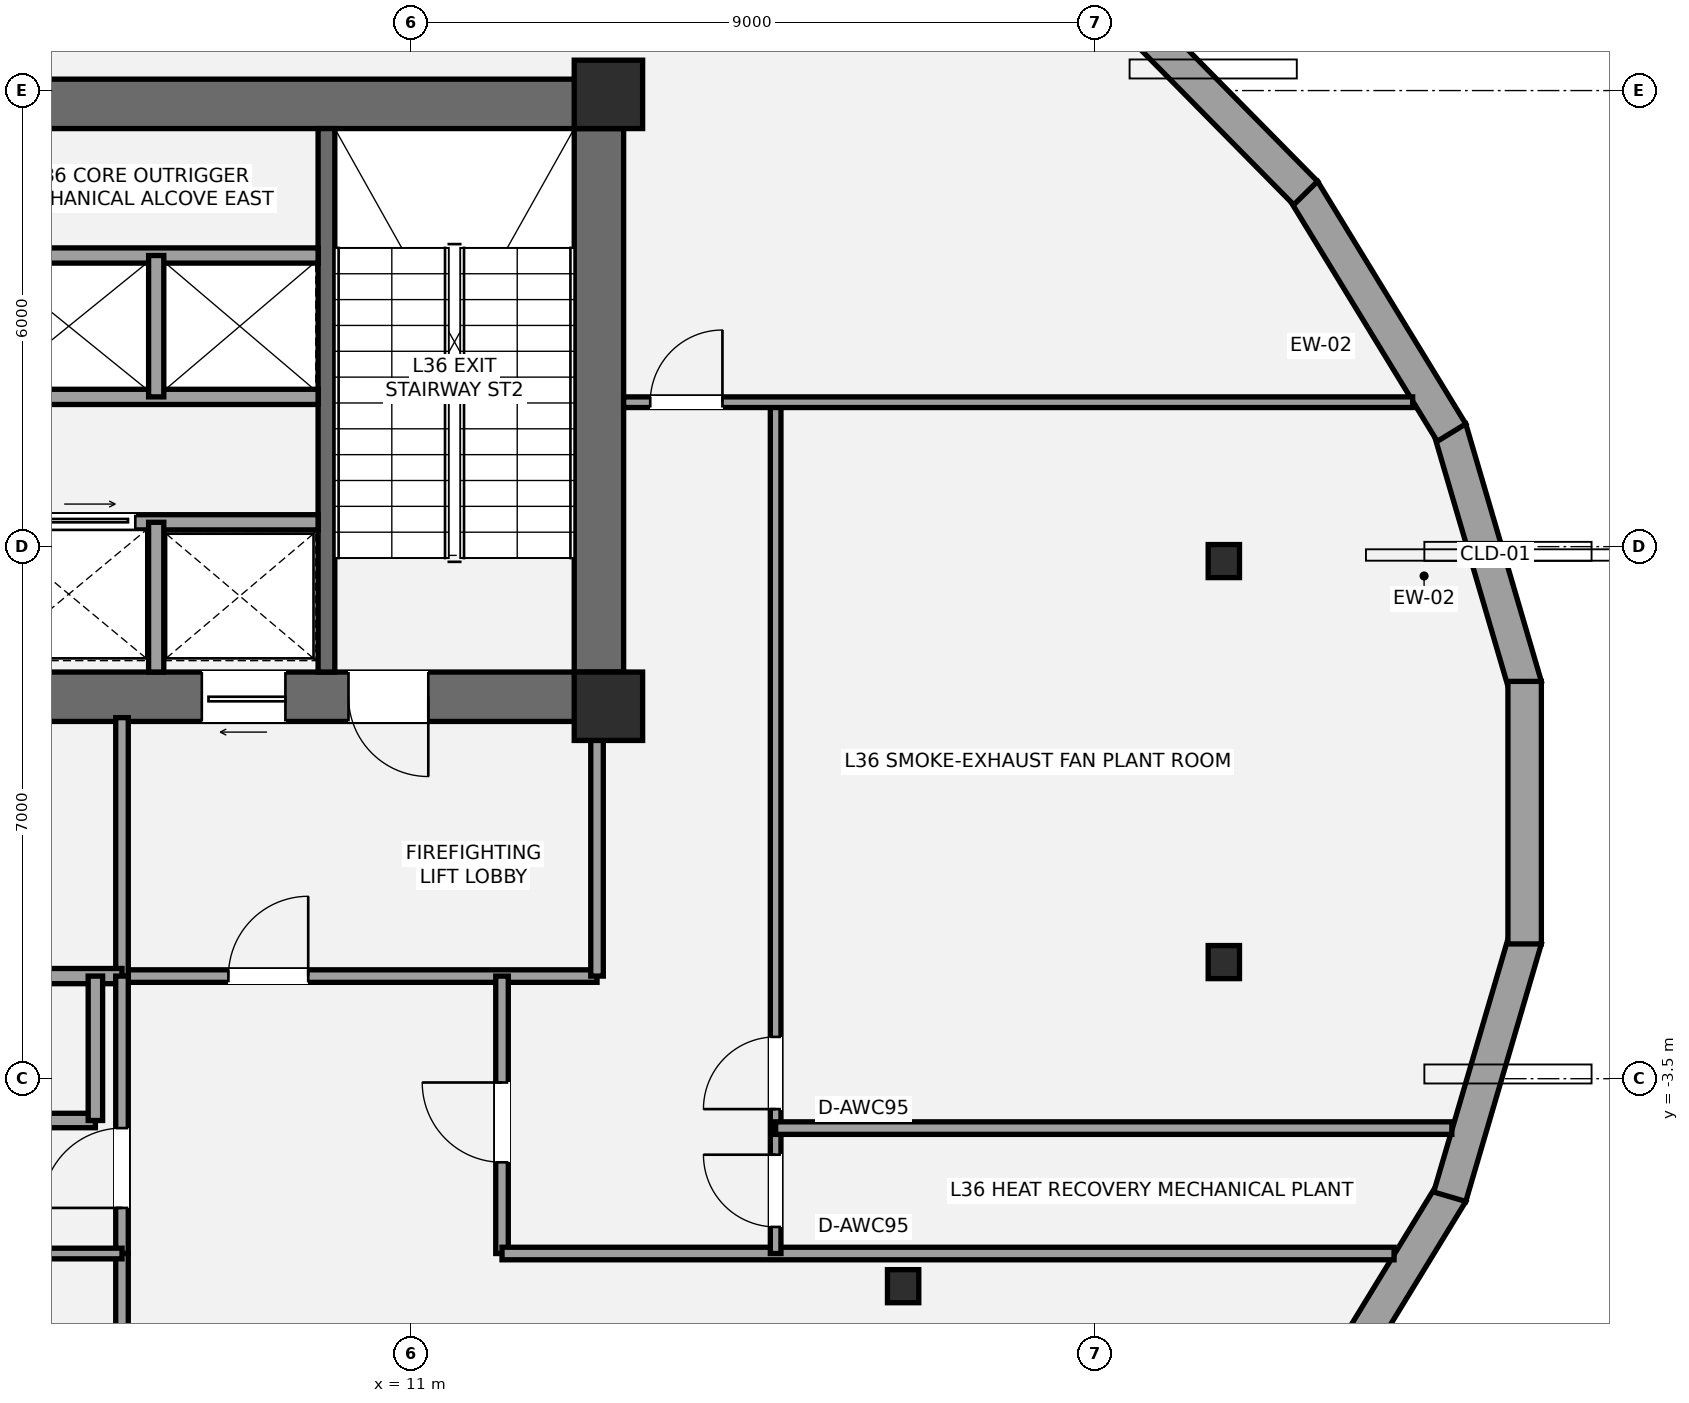
"""IFC4 building model, lengths in metres.
Left out: names, types, materials, properties, quantities, classifications, styles, units other than length and angle.
Written with IfcOpenShell. Run it as: python <this file> out.ifc"""

import sys

from ifc_helpers import new_model, si_unit, direction, frame, frame_2d, origin, origin_2d, place, context, subcontext, project, spatial, rectangle, i_section, extrude, element, fill, save


model = new_model("IFC4")
c1 = context("Model", 3, precision=1e-05, world=origin(), true_north=direction((0.0, 1.0)))
c2 = subcontext(c1, "Body", "Model", "MODEL_VIEW")
j1 = project(units=[si_unit("LENGTHUNIT", "METRE"), si_unit("PLANEANGLEUNIT", "RADIAN")], contexts=[c1])
p1 = place(None, origin())
s1 = spatial("IfcSite", under=j1, at=p1, CompositionType="ELEMENT")
p2 = place(p1, origin())
s2 = spatial("IfcBuilding", under=s1, at=p2, CompositionType="ELEMENT")
p3 = place(p2, frame((0.0, 0.0, 135.1)))
s3 = spatial("IfcBuildingStorey", under=s2, at=p3, CompositionType="ELEMENT", Elevation=135.1)
p4 = place(p3, frame((13.475, 1.2, 0.0), z_axis=(0.0, 0.0, 1.0), x_axis=(0.0, 1.0, 0.0)))
e1 = element("IfcWall", 1, at=p4, inside=s3, PredefinedType="SHEAR", context=c2, shape_type="SweptSolid", body=[
    extrude(rectangle(XDim=8.45, YDim=0.65, at=frame_2d((4.225, 0.0))), origin(), (0.0, 0.0, 1.0), 4.5),
])
p5 = place(p3, frame((4.475, 9.325, 0.0), z_axis=(0.0, 0.0, 1.0), x_axis=(1.0, 0.0, 0.0)))
e2 = element("IfcWall", 2, at=p5, inside=s3, PredefinedType="SHEAR", context=c2, shape_type="SweptSolid", body=[
    extrude(rectangle(XDim=9.325, YDim=0.65, at=frame_2d((4.663, 0.0))), origin(), (0.0, 0.0, 1.0), 4.5),
])
p6 = place(p3, frame((13.8, 1.525, 0.0), z_axis=(0.0, 0.0, 1.0), x_axis=(-1.0, 0.0, 0.0)))
e3 = element("IfcWall", 3, at=p6, inside=s3, PredefinedType="SHEAR", context=c2, shape_type="SweptSolid", body=[
    extrude(rectangle(XDim=8.925, YDim=0.65, at=frame_2d((4.462, 0.0))), origin(), (0.0, 0.0, 1.0), 4.5),
])
p7 = place(p6, frame((2.57, 0.0, 0.0)))
e4 = element("IfcOpeningElement", 4, at=p7, cuts=e3, PredefinedType="OPENING", context=c2, shape_type="SweptSolid", body=[
    extrude(rectangle(XDim=1.05, YDim=2.15, at=frame_2d((0.525, 1.075))), frame((0.0, 0.335, 0.0), z_axis=(0.0, -1.0, 0.0), x_axis=(1.0, 0.0, 0.0)), (0.0, 0.0, 1.0), 0.67),
])
p8 = place(p6, frame((4.45, 0.0, 0.0)))
e5 = element("IfcOpeningElement", 5, at=p8, cuts=e3, PredefinedType="OPENING", context=c2, shape_type="SweptSolid", body=[
    extrude(rectangle(XDim=1.1, YDim=2.2, at=frame_2d((0.55, 1.1))), frame((0.0, 0.335, 0.0), z_axis=(0.0, -1.0, 0.0), x_axis=(1.0, 0.0, 0.0)), (0.0, 0.0, 1.0), 0.67),
])
p9 = place(p3, frame((9.89, 1.85, 0.0), z_axis=(0.0, 0.0, 1.0), x_axis=(0.0, 1.0, 0.0)))
e6 = element("IfcWall", 6, at=p9, inside=s3, PredefinedType="SHEAR", context=c2, shape_type="SweptSolid", body=[
    extrude(rectangle(XDim=7.15, YDim=0.22, at=frame_2d((3.575, 0.0))), origin(), (0.0, 0.0, 1.0), 4.5),
])
for number, where, z_axis, x_axis in (
    (7, (13.6, 1.4, 0.0), (0.0, 0.0, 1.0), (1.0, 0.0, 0.0)),
    (8, (13.6, 9.45, 0.0), (0.0, 0.0, 1.0), (1.0, 0.0, 0.0)),
):
    element("IfcColumn", number, at=place(p3, frame(where, z_axis=z_axis, x_axis=x_axis)), inside=s3, PredefinedType="COLUMN", context=c2, shape_type="SweptSolid", body=[
        extrude(rectangle(XDim=0.9, YDim=0.9, at=origin_2d()), origin(), (0.0, 0.0, 1.0), 4.5),
    ])
for number, where, z_axis, x_axis in (
    (9, (21.697, 3.31, 0.0), (0.0, 0.0, 1.0), (1.0, 0.0, 0.0)),
    (10, (17.477, -6.229, 0.0), (0.0, 0.0, 1.0), (1.0, 0.0, 0.0)),
    (11, (21.697, -1.966, 0.0), (0.0, 0.0, 1.0), (1.0, 0.0, 0.0)),
):
    element("IfcColumn", number, at=place(p3, frame(where, z_axis=z_axis, x_axis=x_axis)), inside=s3, PredefinedType="COLUMN", context=c2, shape_type="SweptSolid", body=[
        extrude(i_section(OverallWidth=0.412, OverallDepth=0.435, WebThickness=0.036, FlangeThickness=0.057, at=origin_2d()), origin(), (0.0, 0.0, 1.0), 4.5),
    ])
p10 = place(p3, frame((24.669, 5.053, 0.0), z_axis=(0.0, 0.0, 1.0), x_axis=(0.28170956188, -0.959499725245, 0.0)))
e12 = element("IfcWall", 12, at=p10, inside=s3, PredefinedType="STANDARD", context=c2, shape_type="SweptSolid", body=[
    extrude(rectangle(XDim=3.531, YDim=0.44, at=frame_2d((1.765, 0.0))), origin(), (0.0, 0.0, 1.0), 3.498),
])
p11 = place(p3, frame((22.742, 8.191, 0.0), z_axis=(0.0, 0.0, 1.0), x_axis=(0.521476412293, -0.853265698022, 0.0)))
e13 = element("IfcWall", 13, at=p11, inside=s3, PredefinedType="STANDARD", context=c2, shape_type="SweptSolid", body=[
    extrude(rectangle(XDim=3.74, YDim=0.44, at=frame_2d((1.87, 0.0))), origin(), (0.0, 0.0, 1.0), 3.498),
])
p12 = place(p3, frame((19.942, 11.023, 0.0), z_axis=(0.0, 0.0, 1.0), x_axis=(0.702094935552, -0.712083352897, 0.0)))
e14 = element("IfcWall", 14, at=p12, inside=s3, PredefinedType="STANDARD", context=c2, shape_type="SweptSolid", body=[
    extrude(rectangle(XDim=4.033, YDim=0.44, at=frame_2d((2.017, 0.0))), origin(), (0.0, 0.0, 1.0), 3.498),
])
p13 = place(p3, frame((24.693, -5.0, 0.0), z_axis=(0.0, 0.0, 1.0), x_axis=(-0.521476412293, -0.853265698022, 0.0)))
e15 = element("IfcWall", 15, at=p13, inside=s3, PredefinedType="STANDARD", context=c2, shape_type="SweptSolid", body=[
    extrude(rectangle(XDim=3.74, YDim=0.44, at=frame_2d((1.87, 0.0))), origin(), (0.0, 0.0, 1.0), 3.498),
])
p14 = place(p3, frame((25.664, -1.665, 0.0), z_axis=(0.0, 0.0, 1.0), x_axis=(-0.28170956188, -0.959499725245, 0.0)))
e16 = element("IfcWall", 16, at=p14, inside=s3, PredefinedType="STANDARD", context=c2, shape_type="SweptSolid", body=[
    extrude(rectangle(XDim=3.531, YDim=0.44, at=frame_2d((1.765, 0.0))), origin(), (0.0, 0.0, 1.0), 3.498),
])
p15 = place(p3, frame((25.655, 1.727, 0.0), z_axis=(0.0, 0.0, 1.0), x_axis=(0.0, -1.0, 0.0)))
e17 = element("IfcWall", 17, at=p15, inside=s3, PredefinedType="STANDARD", context=c2, shape_type="SweptSolid", body=[
    extrude(rectangle(XDim=3.454, YDim=0.44, at=frame_2d((1.727, 0.0))), origin(), (0.0, 0.0, 1.0), 3.498),
])
p16 = place(p3, frame((7.2, -2.15, 0.0), z_axis=(0.0, 0.0, 1.0), x_axis=(1.0, 0.0, 0.0)))
e18 = element("IfcWall", 18, at=p16, inside=s3, PredefinedType="PARTITIONING", context=c2, shape_type="SweptSolid", body=[
    extrude(rectangle(XDim=6.25, YDim=0.165, at=frame_2d((3.125, 0.0))), origin(), (0.0, 0.0, 1.0), 4.28),
])
p17 = place(p16, frame((1.4, 0.0, 0.0)))
e19 = element("IfcOpeningElement", 19, at=p17, cuts=e18, PredefinedType="OPENING", context=c2, shape_type="SweptSolid", body=[
    extrude(rectangle(XDim=1.05, YDim=2.15, at=frame_2d((0.525, 1.075))), frame((0.0, 0.093, 0.0), z_axis=(0.0, -1.0, 0.0), x_axis=(1.0, 0.0, 0.0)), (0.0, 0.0, 1.0), 0.185),
])
p18 = place(p3, frame((7.2, -2.15, 0.0), z_axis=(0.0, 0.0, 1.0), x_axis=(0.0, 1.0, 0.0)))
e20 = element("IfcWall", 20, at=p18, inside=s3, PredefinedType="PARTITIONING", context=c2, shape_type="SweptSolid", body=[
    extrude(rectangle(XDim=3.4, YDim=0.165, at=frame_2d((1.7, 0.0))), origin(), (0.0, 0.0, 1.0), 4.28),
])
p19 = place(p3, frame((13.45, -2.15, 0.0), z_axis=(0.0, 0.0, 1.0), x_axis=(0.0, 1.0, 0.0)))
e21 = element("IfcWall", 21, at=p19, inside=s3, PredefinedType="PARTITIONING", context=c2, shape_type="SweptSolid", body=[
    extrude(rectangle(XDim=3.4, YDim=0.165, at=frame_2d((1.7, 0.0))), origin(), (0.0, 0.0, 1.0), 2.47),
])
p20 = place(p3, frame((4.95, -2.15, 0.0), z_axis=(0.0, 0.0, 1.0), x_axis=(1.0, 0.0, 0.0)))
e22 = element("IfcWall", 22, at=p20, inside=s3, PredefinedType="SOLIDWALL", context=c2, shape_type="SweptSolid", body=[
    extrude(rectangle(XDim=2.25, YDim=0.2, at=frame_2d((1.125, 0.0))), origin(), (0.0, 0.0, 1.0), 2.47),
])
p21 = place(p3, frame((5.525, 3.82, 0.0), z_axis=(0.0, 0.0, 1.0), x_axis=(1.0, 0.0, 0.0)))
e23 = element("IfcWall", 23, at=p21, inside=s3, PredefinedType="SOLIDWALL", context=c2, shape_type="SweptSolid", body=[
    extrude(rectangle(XDim=4.255, YDim=0.2, at=frame_2d((2.127, 0.0))), origin(), (0.0, 0.0, 1.0), 4.28),
])
p22 = place(p21, frame((0.65, 0.0, 0.0)))
e24 = element("IfcOpeningElement", 24, at=p22, cuts=e23, PredefinedType="OPENING", context=c2, shape_type="SweptSolid", body=[
    extrude(rectangle(XDim=1.2, YDim=2.2, at=frame_2d((0.6, 1.1))), frame((0.0, 0.11, 0.0), z_axis=(0.0, -1.0, 0.0), x_axis=(1.0, 0.0, 0.0)), (0.0, 0.0, 1.0), 0.22),
])
p23 = place(p3, frame((7.65, 1.85, 0.0), z_axis=(0.0, 0.0, 1.0), x_axis=(0.0, 1.0, 0.0)))
e25 = element("IfcWall", 25, at=p23, inside=s3, PredefinedType="SOLIDWALL", context=c2, shape_type="SweptSolid", body=[
    extrude(rectangle(XDim=1.97, YDim=0.2, at=frame_2d((0.985, 0.0))), origin(), (0.0, 0.0, 1.0), 4.28),
])
for number, where, z_axis, x_axis in (
    (26, (5.525, 5.47, 0.0), (0.0, 0.0, 1.0), (1.0, 0.0, 0.0)),
    (27, (5.525, 7.33, 0.0), (0.0, 0.0, 1.0), (1.0, 0.0, 0.0)),
):
    element("IfcWall", number, at=place(p3, frame(where, z_axis=z_axis, x_axis=x_axis)), inside=s3, PredefinedType="SOLIDWALL", context=c2, shape_type="SweptSolid", body=[
        extrude(rectangle(XDim=4.255, YDim=0.2, at=frame_2d((2.127, 0.0))), origin(), (0.0, 0.0, 1.0), 4.28),
    ])
p24 = place(p3, frame((7.65, 5.47, 0.0), z_axis=(0.0, 0.0, 1.0), x_axis=(0.0, 1.0, 0.0)))
e28 = element("IfcWall", 28, at=p24, inside=s3, PredefinedType="SOLIDWALL", context=c2, shape_type="SweptSolid", body=[
    extrude(rectangle(XDim=1.86, YDim=0.2, at=frame_2d((0.93, 0.0))), origin(), (0.0, 0.0, 1.0), 4.28),
])
p25 = place(p3, frame((2.1, -4.05, 0.0), z_axis=(0.0, 0.0, 1.0), x_axis=(1.0, 0.0, 0.0)))
e29 = element("IfcWall", 29, at=p25, inside=s3, PredefinedType="PLUMBINGWALL", context=c2, shape_type="SweptSolid", body=[
    extrude(rectangle(XDim=4.75, YDim=0.19, at=frame_2d((2.375, 0.0))), origin(), (0.0, 0.0, 1.0), 2.47),
])
p26 = place(p25, frame((1.8, 0.0, 0.0)))
e30 = element("IfcOpeningElement", 30, at=p26, cuts=e29, PredefinedType="OPENING", context=c2, shape_type="SweptSolid", body=[
    extrude(rectangle(XDim=0.9, YDim=2.1, at=frame_2d((0.45, 1.05))), frame((0.0, 0.105, 0.0), z_axis=(0.0, -1.0, 0.0), x_axis=(1.0, 0.0, 0.0)), (0.0, 0.0, 1.0), 0.21),
])
p27 = place(p3, frame((6.85, -4.05, 0.0), z_axis=(0.0, 0.0, 1.0), x_axis=(0.0, 1.0, 0.0)))
e31 = element("IfcWall", 31, at=p27, inside=s3, PredefinedType="PLUMBINGWALL", context=c2, shape_type="SweptSolid", body=[
    extrude(rectangle(XDim=1.9, YDim=0.19, at=frame_2d((0.95, 0.0))), origin(), (0.0, 0.0, 1.0), 4.28),
])
p28 = place(p3, frame((7.2, -5.8, 0.0), z_axis=(0.0, 0.0, 1.0), x_axis=(0.0, 1.0, 0.0)))
e32 = element("IfcWall", 32, at=p28, inside=s3, PredefinedType="PARTITIONING", context=c2, shape_type="SweptSolid", body=[
    extrude(rectangle(XDim=3.65, YDim=0.165, at=frame_2d((1.825, 0.0))), origin(), (0.0, 0.0, 1.0), 4.28),
])
p29 = place(p28, frame((0.6, 0.0, 0.0)))
e33 = element("IfcOpeningElement", 33, at=p29, cuts=e32, PredefinedType="OPENING", context=c2, shape_type="SweptSolid", body=[
    extrude(rectangle(XDim=1.05, YDim=2.15, at=frame_2d((0.525, 1.075))), frame((0.0, 0.093, 0.0), z_axis=(0.0, -1.0, 0.0), x_axis=(1.0, 0.0, 0.0)), (0.0, 0.0, 1.0), 0.185),
])
p30 = place(p3, frame((12.2, -5.8, 0.0), z_axis=(0.0, 0.0, 1.0), x_axis=(0.0, 1.0, 0.0)))
e34 = element("IfcWall", 34, at=p30, inside=s3, PredefinedType="PARTITIONING", context=c2, shape_type="SweptSolid", body=[
    extrude(rectangle(XDim=3.65, YDim=0.165, at=frame_2d((1.825, 0.0))), origin(), (0.0, 0.0, 1.0), 4.28),
])
p31 = place(p30, frame((1.2, 0.0, 0.0)))
e35 = element("IfcOpeningElement", 35, at=p31, cuts=e34, PredefinedType="OPENING", context=c2, shape_type="SweptSolid", body=[
    extrude(rectangle(XDim=1.05, YDim=2.15, at=frame_2d((0.525, 1.075))), frame((0.0, 0.093, 0.0), z_axis=(0.0, -1.0, 0.0), x_axis=(1.0, 0.0, 0.0)), (0.0, 0.0, 1.0), 0.185),
])
p32 = place(p3, frame((7.2, -16.456, 0.0), z_axis=(0.0, 0.0, 1.0), x_axis=(0.0, 1.0, 0.0)))
e36 = element("IfcWall", 36, at=p32, inside=s3, PredefinedType="PARTITIONING", context=c2, shape_type="SweptSolid", body=[
    extrude(rectangle(XDim=10.656, YDim=0.165, at=frame_2d((5.328, 0.0))), origin(), (0.0, 0.0, 1.0), 4.28),
])
p33 = place(p3, frame((12.2, -5.8, 0.0), z_axis=(0.0, 0.0, 1.0), x_axis=(1.0, 0.0, 0.0)))
e37 = element("IfcWall", 37, at=p33, inside=s3, PredefinedType="PARTITIONING", context=c2, shape_type="SweptSolid", body=[
    extrude(rectangle(XDim=11.737, YDim=0.165, at=frame_2d((5.868, 0.0))), origin(), (0.0, 0.0, 1.0), 2.47),
])
p34 = place(p3, frame((-7.2, -5.8, 0.0), z_axis=(0.0, 0.0, 1.0), x_axis=(1.0, 0.0, 0.0)))
e38 = element("IfcWall", 38, at=p34, inside=s3, PredefinedType="PARTITIONING", context=c2, shape_type="SweptSolid", body=[
    extrude(rectangle(XDim=14.4, YDim=0.14, at=frame_2d((7.2, 0.0))), origin(), (0.0, 0.0, 1.0), 2.47),
])
p35 = place(p34, frame((1.8, 0.0, 0.0)))
e39 = element("IfcOpeningElement", 39, at=p35, cuts=e38, PredefinedType="OPENING", context=c2, shape_type="SweptSolid", body=[
    extrude(rectangle(XDim=0.95, YDim=2.15, at=frame_2d((0.475, 1.075))), frame((0.0, 0.08, 0.0), z_axis=(0.0, -1.0, 0.0), x_axis=(1.0, 0.0, 0.0)), (0.0, 0.0, 1.0), 0.16),
])
p36 = place(p34, frame((9.0, 0.0, 0.0)))
e40 = element("IfcOpeningElement", 40, at=p36, cuts=e38, PredefinedType="OPENING", context=c2, shape_type="SweptSolid", body=[
    extrude(rectangle(XDim=0.95, YDim=2.15, at=frame_2d((0.475, 1.075))), frame((0.0, 0.08, 0.0), z_axis=(0.0, -1.0, 0.0), x_axis=(1.0, 0.0, 0.0)), (0.0, 0.0, 1.0), 0.16),
])
p37 = place(p3, frame((15.8, -5.8, 0.0), z_axis=(0.0, 0.0, 1.0), x_axis=(0.0, 1.0, 0.0)))
e41 = element("IfcWall", 41, at=p37, inside=s3, PredefinedType="PARTITIONING", context=c2, shape_type="SweptSolid", body=[
    extrude(rectangle(XDim=11.2, YDim=0.14, at=frame_2d((5.6, 0.0))), origin(), (0.0, 0.0, 1.0), 2.47),
])
p38 = place(p37, frame((0.35, 0.0, 0.0)))
e42 = element("IfcOpeningElement", 42, at=p38, cuts=e41, PredefinedType="OPENING", context=c2, shape_type="SweptSolid", body=[
    extrude(rectangle(XDim=0.95, YDim=2.15, at=frame_2d((0.475, 1.075))), frame((0.0, 0.08, 0.0), z_axis=(0.0, -1.0, 0.0), x_axis=(1.0, 0.0, 0.0)), (0.0, 0.0, 1.0), 0.16),
])
p39 = place(p37, frame((1.9, 0.0, 0.0)))
e43 = element("IfcOpeningElement", 43, at=p39, cuts=e41, PredefinedType="OPENING", context=c2, shape_type="SweptSolid", body=[
    extrude(rectangle(XDim=0.95, YDim=2.15, at=frame_2d((0.475, 1.075))), frame((0.0, 0.08, 0.0), z_axis=(0.0, -1.0, 0.0), x_axis=(1.0, 0.0, 0.0)), (0.0, 0.0, 1.0), 0.16),
])
p40 = place(p3, frame((13.8, 5.4, 0.0), z_axis=(0.0, 0.0, 1.0), x_axis=(1.0, 0.0, 0.0)))
e44 = element("IfcWall", 44, at=p40, inside=s3, PredefinedType="PARTITIONING", context=c2, shape_type="SweptSolid", body=[
    extrude(rectangle(XDim=10.381, YDim=0.14, at=frame_2d((5.19, 0.0))), origin(), (0.0, 0.0, 1.0), 4.28),
])
p41 = place(p40, frame((0.35, 0.0, 0.0)))
e45 = element("IfcOpeningElement", 45, at=p41, cuts=e44, PredefinedType="OPENING", context=c2, shape_type="SweptSolid", body=[
    extrude(rectangle(XDim=0.95, YDim=2.15, at=frame_2d((0.475, 1.075))), frame((0.0, 0.08, 0.0), z_axis=(0.0, -1.0, 0.0), x_axis=(1.0, 0.0, 0.0)), (0.0, 0.0, 1.0), 0.16),
])
p42 = place(p3, frame((15.8, -4.15, 0.0), z_axis=(0.0, 0.0, 1.0), x_axis=(1.0, 0.0, 0.0)))
e46 = element("IfcWall", 46, at=p42, inside=s3, PredefinedType="PARTITIONING", context=c2, shape_type="SweptSolid", body=[
    extrude(rectangle(XDim=8.897, YDim=0.165, at=frame_2d((4.448, 0.0))), origin(), (0.0, 0.0, 1.0), 2.47),
])
p43 = place(p7, origin())
e47 = element("IfcDoor", 47, at=p43, inside=s3, OperationType="SINGLE_SWING_LEFT", PredefinedType="DOOR", context=c2, shape_type="SweptSolid", body=[
    extrude(rectangle(XDim=1.05, YDim=2.15, at=frame_2d((0.525, 1.075))), frame((0.0, 0.025, 0.0), z_axis=(0.0, -1.0, 0.0), x_axis=(1.0, 0.0, 0.0)), (0.0, 0.0, 1.0), 0.05),
])
fill(e4, e47)
p44 = place(p8, origin())
e48 = element("IfcDoor", 48, at=p44, inside=s3, OperationType="SLIDING_TO_LEFT", PredefinedType="DOOR", context=c2, shape_type="SweptSolid", body=[
    extrude(rectangle(XDim=1.1, YDim=2.2, at=frame_2d((0.55, 1.1))), frame((0.0, 0.025, 0.0), z_axis=(0.0, -1.0, 0.0), x_axis=(1.0, 0.0, 0.0)), (0.0, 0.0, 1.0), 0.05),
])
fill(e5, e48)
p45 = place(p22, origin())
e49 = element("IfcDoor", 49, at=p45, inside=s3, OperationType="SLIDING_TO_RIGHT", PredefinedType="DOOR", context=c2, shape_type="SweptSolid", body=[
    extrude(rectangle(XDim=1.2, YDim=2.2, at=frame_2d((0.6, 1.1))), frame((0.0, 0.025, 0.0), z_axis=(0.0, -1.0, 0.0), x_axis=(1.0, 0.0, 0.0)), (0.0, 0.0, 1.0), 0.05),
])
fill(e24, e49)
p46 = place(p17, origin())
e50 = element("IfcDoor", 50, at=p46, inside=s3, OperationType="SINGLE_SWING_RIGHT", PredefinedType="DOOR", context=c2, shape_type="SweptSolid", body=[
    extrude(rectangle(XDim=1.05, YDim=2.15, at=frame_2d((0.525, 1.075))), frame((0.0, 0.025, 0.0), z_axis=(0.0, -1.0, 0.0), x_axis=(1.0, 0.0, 0.0)), (0.0, 0.0, 1.0), 0.05),
])
fill(e19, e50)
p47 = place(p29, origin())
e51 = element("IfcDoor", 51, at=p47, inside=s3, OperationType="SINGLE_SWING_LEFT", PredefinedType="DOOR", context=c2, shape_type="SweptSolid", body=[
    extrude(rectangle(XDim=1.05, YDim=2.15, at=frame_2d((0.525, 1.075))), frame((0.0, 0.025, 0.0), z_axis=(0.0, -1.0, 0.0), x_axis=(1.0, 0.0, 0.0)), (0.0, 0.0, 1.0), 0.05),
])
fill(e33, e51)
p48 = place(p31, origin())
e52 = element("IfcDoor", 52, at=p48, inside=s3, OperationType="SINGLE_SWING_RIGHT", PredefinedType="DOOR", context=c2, shape_type="SweptSolid", body=[
    extrude(rectangle(XDim=1.05, YDim=2.15, at=frame_2d((0.525, 1.075))), frame((0.0, 0.025, 0.0), z_axis=(0.0, -1.0, 0.0), x_axis=(1.0, 0.0, 0.0)), (0.0, 0.0, 1.0), 0.05),
])
fill(e35, e52)
p49 = place(p38, origin())
e53 = element("IfcDoor", 53, at=p49, inside=s3, OperationType="SINGLE_SWING_RIGHT", PredefinedType="DOOR", context=c2, shape_type="SweptSolid", body=[
    extrude(rectangle(XDim=0.95, YDim=2.15, at=frame_2d((0.475, 1.075))), frame((0.0, 0.025, 0.0), z_axis=(0.0, -1.0, 0.0), x_axis=(1.0, 0.0, 0.0)), (0.0, 0.0, 1.0), 0.05),
])
fill(e42, e53)
p50 = place(p39, origin())
e54 = element("IfcDoor", 54, at=p50, inside=s3, OperationType="SINGLE_SWING_LEFT", PredefinedType="DOOR", context=c2, shape_type="SweptSolid", body=[
    extrude(rectangle(XDim=0.95, YDim=2.15, at=frame_2d((0.475, 1.075))), frame((0.0, 0.025, 0.0), z_axis=(0.0, -1.0, 0.0), x_axis=(1.0, 0.0, 0.0)), (0.0, 0.0, 1.0), 0.05),
])
fill(e43, e54)
p51 = place(p41, origin())
e55 = element("IfcDoor", 55, at=p51, inside=s3, OperationType="SINGLE_SWING_RIGHT", PredefinedType="DOOR", context=c2, shape_type="SweptSolid", body=[
    extrude(rectangle(XDim=0.95, YDim=2.15, at=frame_2d((0.475, 1.075))), frame((0.0, 0.025, 0.0), z_axis=(0.0, -1.0, 0.0), x_axis=(1.0, 0.0, 0.0)), (0.0, 0.0, 1.0), 0.05),
])
fill(e45, e55)
save(model, sys.argv[1])
